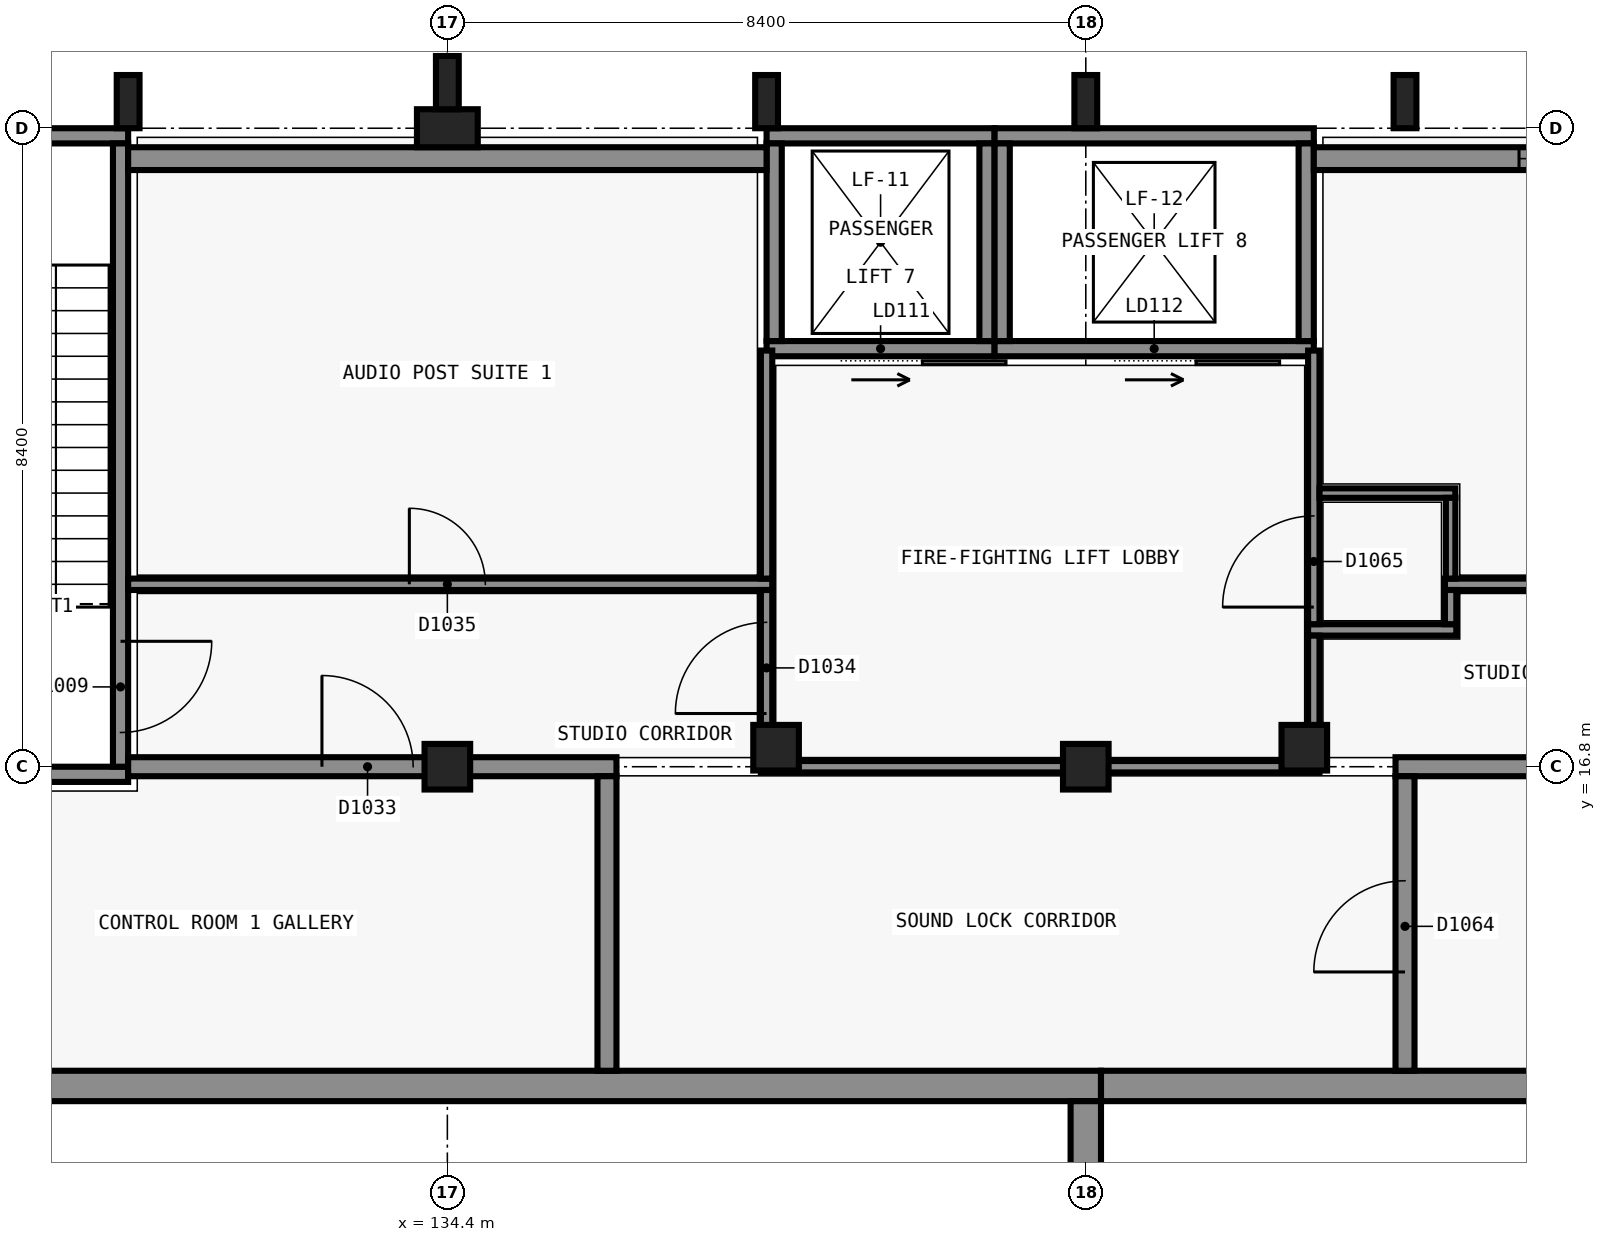
"""IFC4 building model, lengths in metres.
Left out: names, types, materials, properties, quantities, classifications, styles, units other than length and angle.
Written with IfcOpenShell. Run it as: python <this file> out.ifc"""

import sys

from ifc_helpers import new_model, si_unit, direction, frame, frame_2d, origin, origin_2d, place, context, subcontext, project, spatial, rectangle, extrude, element, fill, save


model = new_model("IFC4")
c1 = context("Model", 3, precision=1e-05, world=origin(), true_north=direction((0.0, 1.0)))
c2 = subcontext(c1, "Body", "Model", "MODEL_VIEW")
j1 = project(units=[si_unit("LENGTHUNIT", "METRE"), si_unit("PLANEANGLEUNIT", "RADIAN")], contexts=[c1])
p1 = place(None, origin())
s1 = spatial("IfcSite", under=j1, at=p1, CompositionType="ELEMENT")
p2 = place(p1, origin())
s2 = spatial("IfcBuilding", under=s1, at=p2, CompositionType="ELEMENT")
p3 = place(p2, frame((0.0, 0.0, 5.4)))
s3 = spatial("IfcBuildingStorey", under=s2, at=p3, CompositionType="ELEMENT", Elevation=5.4)
for number, where, z_axis, x_axis in (
    (1, (130.2, 16.7, 0.0), (0.0, 0.0, 1.0), (-1.0, 0.0, 0.0)),
    (2, (126.0, 25.1, 0.0), (0.0, 0.0, 1.0), (1.0, 0.0, 0.0)),
):
    element("IfcWall", number, at=place(p3, frame(where, z_axis=z_axis, x_axis=x_axis)), inside=s3, PredefinedType="SHEAR", context=c2, shape_type="SweptSolid", body=[
        extrude(rectangle(XDim=4.2, YDim=0.2, at=frame_2d((2.1, 0.0))), origin(), (0.0, 0.0, 1.0), 4.8),
    ])
p4 = place(p3, frame((130.1, 25.0, 0.0), z_axis=(0.0, 0.0, 1.0), x_axis=(0.0, -1.0, 0.0)))
e3 = element("IfcWall", 3, at=p4, inside=s3, PredefinedType="SHEAR", context=c2, shape_type="SweptSolid", body=[
    extrude(rectangle(XDim=8.2, YDim=0.2, at=frame_2d((4.1, 0.0))), origin(), (0.0, 0.0, 1.0), 4.8),
])
p5 = place(p4, frame((6.55, 0.0, 0.0)))
e4 = element("IfcOpeningElement", 4, at=p5, cuts=e3, PredefinedType="OPENING", context=c2, shape_type="SweptSolid", body=[
    extrude(rectangle(XDim=1.2, YDim=2.1, at=frame_2d((0.6, 1.05))), frame((0.0, 0.11, 0.0), z_axis=(0.0, -1.0, 0.0), x_axis=(1.0, 0.0, 0.0)), (0.0, 0.0, 1.0), 0.22),
])
p6 = place(p3, frame((141.6, 22.3, 0.0), z_axis=(0.0, 0.0, 1.0), x_axis=(-1.0, 0.0, 0.0)))
e5 = element("IfcWall", 5, at=p6, inside=s3, PredefinedType="SHEAR", context=c2, shape_type="SweptSolid", body=[
    extrude(rectangle(XDim=3.0, YDim=0.2, at=frame_2d((1.5, 0.0))), origin(), (0.0, 0.0, 1.0), 4.8),
])
p7 = place(p6, frame((0.95, 0.0, 0.0)))
e6 = element("IfcOpeningElement", 6, at=p7, cuts=e5, PredefinedType="OPENING", context=c2, shape_type="SweptSolid", body=[
    extrude(rectangle(XDim=1.1, YDim=2.1, at=frame_2d((0.55, 1.05))), frame((0.0, 0.11, 0.0), z_axis=(0.0, -1.0, 0.0), x_axis=(1.0, 0.0, 0.0)), (0.0, 0.0, 1.0), 0.22),
])
p8 = place(p3, frame((138.6, 25.1, 0.0), z_axis=(0.0, 0.0, 1.0), x_axis=(1.0, 0.0, 0.0)))
e7 = element("IfcWall", 7, at=p8, inside=s3, PredefinedType="SHEAR", context=c2, shape_type="SweptSolid", body=[
    extrude(rectangle(XDim=3.0, YDim=0.2, at=frame_2d((1.5, 0.0))), origin(), (0.0, 0.0, 1.0), 4.8),
])
for number, where, z_axis, x_axis in (
    (8, (138.7, 22.4, 0.0), (0.0, 0.0, 1.0), (0.0, 1.0, 0.0)),
    (9, (141.5, 25.0, 0.0), (0.0, 0.0, 1.0), (0.0, -1.0, 0.0)),
):
    element("IfcWall", number, at=place(p3, frame(where, z_axis=z_axis, x_axis=x_axis)), inside=s3, PredefinedType="SHEAR", context=c2, shape_type="SweptSolid", body=[
        extrude(rectangle(XDim=2.6, YDim=0.2, at=frame_2d((1.3, 0.0))), origin(), (0.0, 0.0, 1.0), 4.8),
    ])
p9 = place(p3, frame((145.8, 22.3, 0.0), z_axis=(0.0, 0.0, 1.0), x_axis=(-1.0, 0.0, 0.0)))
e10 = element("IfcWall", 10, at=p9, inside=s3, PredefinedType="SHEAR", context=c2, shape_type="SweptSolid", body=[
    extrude(rectangle(XDim=4.2, YDim=0.2, at=frame_2d((2.1, 0.0))), origin(), (0.0, 0.0, 1.0), 4.8),
])
p10 = place(p9, frame((1.55, 0.0, 0.0)))
e11 = element("IfcOpeningElement", 11, at=p10, cuts=e10, PredefinedType="OPENING", context=c2, shape_type="SweptSolid", body=[
    extrude(rectangle(XDim=1.1, YDim=2.1, at=frame_2d((0.55, 1.05))), frame((0.0, 0.11, 0.0), z_axis=(0.0, -1.0, 0.0), x_axis=(1.0, 0.0, 0.0)), (0.0, 0.0, 1.0), 0.22),
])
p11 = place(p3, frame((141.6, 25.1, 0.0), z_axis=(0.0, 0.0, 1.0), x_axis=(1.0, 0.0, 0.0)))
e12 = element("IfcWall", 12, at=p11, inside=s3, PredefinedType="SHEAR", context=c2, shape_type="SweptSolid", body=[
    extrude(rectangle(XDim=4.2, YDim=0.2, at=frame_2d((2.1, 0.0))), origin(), (0.0, 0.0, 1.0), 4.8),
])
for number, where, z_axis, x_axis in (
    (13, (141.7, 22.4, 0.0), (0.0, 0.0, 1.0), (0.0, 1.0, 0.0)),
    (14, (145.7, 25.0, 0.0), (0.0, 0.0, 1.0), (0.0, -1.0, 0.0)),
):
    element("IfcWall", number, at=place(p3, frame(where, z_axis=z_axis, x_axis=x_axis)), inside=s3, PredefinedType="SHEAR", context=c2, shape_type="SweptSolid", body=[
        extrude(rectangle(XDim=2.6, YDim=0.2, at=frame_2d((1.3, 0.0))), origin(), (0.0, 0.0, 1.0), 4.8),
    ])
p12 = place(p3, frame((126.0, 12.6, 0.0), z_axis=(0.0, 0.0, 1.0), x_axis=(1.0, 0.0, 0.0)))
e15 = element("IfcWall", 15, at=p12, inside=s3, PredefinedType="SHEAR", context=c2, shape_type="SweptSolid", body=[
    extrude(rectangle(XDim=17.0, YDim=0.4, at=frame_2d((8.5, 0.0))), origin(), (0.0, 0.0, 1.0), 4.8),
])
p13 = place(p3, frame((142.8, 12.4, 0.0), z_axis=(0.0, 0.0, 1.0), x_axis=(0.0, -1.0, 0.0)))
e16 = element("IfcWall", 16, at=p13, inside=s3, PredefinedType="SHEAR", context=c2, shape_type="SweptSolid", body=[
    extrude(rectangle(XDim=12.0, YDim=0.4, at=frame_2d((6.0, 0.0))), origin(), (0.0, 0.0, 1.0), 4.8),
])
p14 = place(p3, frame((143.0, 12.6, 0.0), z_axis=(0.0, 0.0, 1.0), x_axis=(1.0, 0.0, 0.0)))
e17 = element("IfcWall", 17, at=p14, inside=s3, PredefinedType="SHEAR", context=c2, shape_type="SweptSolid", body=[
    extrude(rectangle(XDim=25.0, YDim=0.4, at=frame_2d((12.5, 0.0))), origin(), (0.0, 0.0, 1.0), 4.8),
])
p15 = place(p3, frame((134.4, 16.8, 0.0), z_axis=(0.0, 0.0, 1.0), x_axis=(1.0, 0.0, 0.0)))
e18 = element("IfcColumn", 18, at=p15, inside=s3, PredefinedType="COLUMN", context=c2, shape_type="SweptSolid", body=[
    extrude(rectangle(XDim=0.6, YDim=0.6, at=origin_2d()), origin(), (0.0, 0.0, 1.0), 4.8),
])
p16 = place(p3, frame((134.4, 25.2, 0.0), z_axis=(0.0, 0.0, 1.0), x_axis=(1.0, 0.0, 0.0)))
e19 = element("IfcColumn", 19, at=p16, inside=s3, PredefinedType="COLUMN", context=c2, shape_type="SweptSolid", body=[
    extrude(rectangle(XDim=0.8, YDim=0.5, at=origin_2d()), origin(), (0.0, 0.0, 1.0), 4.8),
])
for number, where, z_axis, x_axis in (
    (20, (142.8, 16.8, 0.0), (0.0, 0.0, 1.0), (1.0, 0.0, 0.0)),
    (21, (138.725, 17.05, 0.0), (0.0, 0.0, 1.0), (1.0, 0.0, 0.0)),
    (22, (145.675, 17.05, 0.0), (0.0, 0.0, 1.0), (1.0, 0.0, 0.0)),
):
    element("IfcColumn", number, at=place(p3, frame(where, z_axis=z_axis, x_axis=x_axis)), inside=s3, PredefinedType="COLUMN", context=c2, shape_type="SweptSolid", body=[
        extrude(rectangle(XDim=0.6, YDim=0.6, at=origin_2d()), origin(), (0.0, 0.0, 1.0), 4.8),
    ])
p17 = place(p3, frame((130.2, 24.8, 0.0), z_axis=(0.0, 0.0, 1.0), x_axis=(1.0, 0.0, 0.0)))
e23 = element("IfcWall", 23, at=p17, inside=s3, PredefinedType="SOLIDWALL", context=c2, shape_type="SweptSolid", body=[
    extrude(rectangle(XDim=8.4, YDim=0.3, at=frame_2d((4.2, 0.0))), origin(), (0.0, 0.0, 1.0), 4.5),
])
p18 = place(p3, frame((145.8, 24.8, 0.0), z_axis=(0.0, 0.0, 1.0), x_axis=(1.0, 0.0, 0.0)))
e24 = element("IfcWall", 24, at=p18, inside=s3, PredefinedType="SOLIDWALL", context=c2, shape_type="SweptSolid", body=[
    extrude(rectangle(XDim=18.0, YDim=0.3, at=frame_2d((9.0, 0.0))), origin(), (0.0, 0.0, 1.0), 4.5),
])
p19 = place(p18, frame((2.7, 0.0, 1.5)))
e25 = element("IfcOpeningElement", 25, at=p19, cuts=e24, PredefinedType="OPENING", context=c2, shape_type="SweptSolid", body=[
    extrude(rectangle(XDim=1.2, YDim=0.9, at=frame_2d((0.6, 0.45))), frame((0.0, 0.16, 0.0), z_axis=(0.0, -1.0, 0.0), x_axis=(1.0, 0.0, 0.0)), (0.0, 0.0, 1.0), 0.32),
])
p20 = place(p18, frame((6.9, 0.0, 1.5)))
e26 = element("IfcOpeningElement", 26, at=p20, cuts=e24, PredefinedType="OPENING", context=c2, shape_type="SweptSolid", body=[
    extrude(rectangle(XDim=1.2, YDim=0.9, at=frame_2d((0.6, 0.45))), frame((0.0, 0.16, 0.0), z_axis=(0.0, -1.0, 0.0), x_axis=(1.0, 0.0, 0.0)), (0.0, 0.0, 1.0), 0.32),
])
for number, where, z_axis, x_axis in (
    (27, (130.2, 25.55, 0.0), (0.0, 0.0, 1.0), (1.0, 0.0, 0.0)),
    (28, (134.4, 25.8, 0.0), (0.0, 0.0, 1.0), (1.0, 0.0, 0.0)),
    (29, (138.6, 25.55, 0.0), (0.0, 0.0, 1.0), (1.0, 0.0, 0.0)),
    (30, (142.8, 25.55, 0.0), (0.0, 0.0, 1.0), (1.0, 0.0, 0.0)),
    (31, (147.0, 25.55, 0.0), (0.0, 0.0, 1.0), (1.0, 0.0, 0.0)),
):
    element("IfcColumn", number, at=place(p3, frame(where, z_axis=z_axis, x_axis=x_axis)), inside=s3, PredefinedType="PILASTER", context=c2, shape_type="SweptSolid", body=[
        extrude(rectangle(XDim=0.3, YDim=0.7, at=origin_2d()), origin(), (0.0, 0.0, 1.0), 4.8),
    ])
p21 = place(p3, frame((130.2, 16.8, 0.0), z_axis=(0.0, 0.0, 1.0), x_axis=(1.0, 0.0, 0.0)))
e32 = element("IfcWall", 32, at=p21, inside=s3, PredefinedType="PARTITIONING", context=c2, shape_type="SweptSolid", body=[
    extrude(rectangle(XDim=6.425, YDim=0.25, at=frame_2d((3.212, 0.0))), origin(), (0.0, 0.0, 1.0), 3.8),
])
p22 = place(p21, frame((2.55, 0.0, 0.0)))
e33 = element("IfcOpeningElement", 33, at=p22, cuts=e32, PredefinedType="OPENING", context=c2, shape_type="SweptSolid", body=[
    extrude(rectangle(XDim=1.2, YDim=2.1, at=frame_2d((0.6, 1.05))), frame((0.0, 0.135, 0.0), z_axis=(0.0, -1.0, 0.0), x_axis=(1.0, 0.0, 0.0)), (0.0, 0.0, 1.0), 0.27),
])
p23 = place(p3, frame((146.875, 16.8, 0.0), z_axis=(0.0, 0.0, 1.0), x_axis=(1.0, 0.0, 0.0)))
e34 = element("IfcWall", 34, at=p23, inside=s3, PredefinedType="PARTITIONING", context=c2, shape_type="SweptSolid", body=[
    extrude(rectangle(XDim=16.925, YDim=0.25, at=frame_2d((8.462, 0.0))), origin(), (0.0, 0.0, 1.0), 3.8),
])
p24 = place(p3, frame((136.5, 12.8, 0.0), z_axis=(0.0, 0.0, 1.0), x_axis=(0.0, 1.0, 0.0)))
e35 = element("IfcWall", 35, at=p24, inside=s3, PredefinedType="PARTITIONING", context=c2, shape_type="SweptSolid", body=[
    extrude(rectangle(XDim=3.875, YDim=0.25, at=frame_2d((1.938, 0.0))), origin(), (0.0, 0.0, 1.0), 3.8),
])
p25 = place(p3, frame((147.0, 12.8, 0.0), z_axis=(0.0, 0.0, 1.0), x_axis=(0.0, 1.0, 0.0)))
e36 = element("IfcWall", 36, at=p25, inside=s3, PredefinedType="PARTITIONING", context=c2, shape_type="SweptSolid", body=[
    extrude(rectangle(XDim=3.875, YDim=0.25, at=frame_2d((1.938, 0.0))), origin(), (0.0, 0.0, 1.0), 3.8),
])
p26 = place(p25, frame((1.3, 0.0, 0.0)))
e37 = element("IfcOpeningElement", 37, at=p26, cuts=e36, PredefinedType="OPENING", context=c2, shape_type="SweptSolid", body=[
    extrude(rectangle(XDim=1.2, YDim=2.1, at=frame_2d((0.6, 1.05))), frame((0.0, 0.135, 0.0), z_axis=(0.0, -1.0, 0.0), x_axis=(1.0, 0.0, 0.0)), (0.0, 0.0, 1.0), 0.27),
])
p27 = place(p3, frame((145.725, 18.6, 0.0), z_axis=(0.0, 0.0, 1.0), x_axis=(1.0, 0.0, 0.0)))
e38 = element("IfcWall", 38, at=p27, inside=s3, PredefinedType="PARTITIONING", context=c2, shape_type="SweptSolid", body=[
    extrude(rectangle(XDim=1.95, YDim=0.15, at=frame_2d((0.975, 0.0))), origin(), (0.0, 0.0, 1.0), 4.5),
])
p28 = place(p3, frame((130.2, 19.2, 0.0), z_axis=(0.0, 0.0, 1.0), x_axis=(1.0, 0.0, 0.0)))
e39 = element("IfcWall", 39, at=p28, inside=s3, PredefinedType="PARTITIONING", context=c2, shape_type="SweptSolid", body=[
    extrude(rectangle(XDim=8.475, YDim=0.15, at=frame_2d((4.237, 0.0))), origin(), (0.0, 0.0, 1.0), 3.8),
])
p29 = place(p28, frame((3.7, 0.0, 0.0)))
e40 = element("IfcOpeningElement", 40, at=p29, cuts=e39, PredefinedType="OPENING", context=c2, shape_type="SweptSolid", body=[
    extrude(rectangle(XDim=1.0, YDim=2.1, at=frame_2d((0.5, 1.05))), frame((0.0, 0.085, 0.0), z_axis=(0.0, -1.0, 0.0), x_axis=(1.0, 0.0, 0.0)), (0.0, 0.0, 1.0), 0.17),
])
p30 = place(p3, frame((147.525, 19.2, 0.0), z_axis=(0.0, 0.0, 1.0), x_axis=(1.0, 0.0, 0.0)))
e41 = element("IfcWall", 41, at=p30, inside=s3, PredefinedType="PARTITIONING", context=c2, shape_type="SweptSolid", body=[
    extrude(rectangle(XDim=16.275, YDim=0.15, at=frame_2d((8.137, 0.0))), origin(), (0.0, 0.0, 1.0), 3.8),
])
p31 = place(p30, frame((11.575, 0.0, 0.0)))
e42 = element("IfcOpeningElement", 42, at=p31, cuts=e41, PredefinedType="OPENING", context=c2, shape_type="SweptSolid", body=[
    extrude(rectangle(XDim=1.0, YDim=2.1, at=frame_2d((0.5, 1.05))), frame((0.0, 0.085, 0.0), z_axis=(0.0, -1.0, 0.0), x_axis=(1.0, 0.0, 0.0)), (0.0, 0.0, 1.0), 0.17),
])
p32 = place(p3, frame((138.525, 16.8, 0.0), z_axis=(0.0, 0.0, 1.0), x_axis=(1.0, 0.0, 0.0)))
e43 = element("IfcWall", 43, at=p32, inside=s3, PredefinedType="SOLIDWALL", context=c2, shape_type="SweptSolid", body=[
    extrude(rectangle(XDim=7.35, YDim=0.15, at=frame_2d((3.675, 0.0))), origin(), (0.0, 0.0, 1.0), 3.8),
])
p33 = place(p3, frame((147.6, 18.675, 0.0), z_axis=(0.0, 0.0, 1.0), x_axis=(0.0, 1.0, 0.0)))
e44 = element("IfcWall", 44, at=p33, inside=s3, PredefinedType="PARTITIONING", context=c2, shape_type="SweptSolid", body=[
    extrude(rectangle(XDim=0.45, YDim=0.15, at=frame_2d((0.225, 0.0))), origin(), (0.0, 0.0, 1.0), 4.5),
])
p34 = place(p3, frame((138.6, 16.875, 0.0), z_axis=(0.0, 0.0, 1.0), x_axis=(0.0, 1.0, 0.0)))
e45 = element("IfcWall", 45, at=p34, inside=s3, PredefinedType="SOLIDWALL", context=c2, shape_type="SweptSolid", body=[
    extrude(rectangle(XDim=2.25, YDim=0.15, at=frame_2d((1.125, 0.0))), origin(), (0.0, 0.0, 1.0), 3.8),
])
p35 = place(p34, frame((0.625, 0.0, 0.0)))
e46 = element("IfcOpeningElement", 46, at=p35, cuts=e45, PredefinedType="OPENING", context=c2, shape_type="SweptSolid", body=[
    extrude(rectangle(XDim=1.2, YDim=2.1, at=frame_2d((0.6, 1.05))), frame((0.0, 0.085, 0.0), z_axis=(0.0, -1.0, 0.0), x_axis=(1.0, 0.0, 0.0)), (0.0, 0.0, 1.0), 0.17),
])
p36 = place(p3, frame((138.6, 19.275, 0.0), z_axis=(0.0, 0.0, 1.0), x_axis=(0.0, 1.0, 0.0)))
e47 = element("IfcWall", 47, at=p36, inside=s3, PredefinedType="SOLIDWALL", context=c2, shape_type="SweptSolid", body=[
    extrude(rectangle(XDim=3.0, YDim=0.15, at=frame_2d((1.5, 0.0))), origin(), (0.0, 0.0, 1.0), 4.5),
])
p37 = place(p3, frame((145.8, 16.875, 0.0), z_axis=(0.0, 0.0, 1.0), x_axis=(0.0, 1.0, 0.0)))
e48 = element("IfcWall", 48, at=p37, inside=s3, PredefinedType="SOLIDWALL", context=c2, shape_type="SweptSolid", body=[
    extrude(rectangle(XDim=1.65, YDim=0.15, at=frame_2d((0.825, 0.0))), origin(), (0.0, 0.0, 1.0), 3.8),
])
p38 = place(p3, frame((145.8, 18.675, 0.0), z_axis=(0.0, 0.0, 1.0), x_axis=(0.0, 1.0, 0.0)))
e49 = element("IfcWall", 49, at=p38, inside=s3, PredefinedType="SOLIDWALL", context=c2, shape_type="SweptSolid", body=[
    extrude(rectangle(XDim=3.6, YDim=0.15, at=frame_2d((1.8, 0.0))), origin(), (0.0, 0.0, 1.0), 4.5),
])
p39 = place(p38, frame((0.225, 0.0, 0.0)))
e50 = element("IfcOpeningElement", 50, at=p39, cuts=e49, PredefinedType="OPENING", context=c2, shape_type="SweptSolid", body=[
    extrude(rectangle(XDim=1.2, YDim=2.1, at=frame_2d((0.6, 1.05))), frame((0.0, 0.085, 0.0), z_axis=(0.0, -1.0, 0.0), x_axis=(1.0, 0.0, 0.0)), (0.0, 0.0, 1.0), 0.17),
])
p40 = place(p3, frame((145.875, 20.4, 0.0), z_axis=(0.0, 0.0, 1.0), x_axis=(1.0, 0.0, 0.0)))
e51 = element("IfcWall", 51, at=p40, inside=s3, PredefinedType="PARTITIONING", context=c2, shape_type="SweptSolid", body=[
    extrude(rectangle(XDim=1.788, YDim=0.125, at=frame_2d((0.894, 0.0))), origin(), (0.0, 0.0, 1.0), 4.5),
])
p41 = place(p3, frame((147.6, 19.275, 0.0), z_axis=(0.0, 0.0, 1.0), x_axis=(0.0, 1.0, 0.0)))
e52 = element("IfcWall", 52, at=p41, inside=s3, PredefinedType="PARTITIONING", context=c2, shape_type="SweptSolid", body=[
    extrude(rectangle(XDim=1.062, YDim=0.125, at=frame_2d((0.531, 0.0))), origin(), (0.0, 0.0, 1.0), 4.5),
])
p42 = place(p19, origin())
e53 = element("IfcWindow", 53, at=p42, inside=s3, PartitioningType="SINGLE_PANEL", PredefinedType="WINDOW", context=c2, shape_type="SweptSolid", body=[
    extrude(rectangle(XDim=1.2, YDim=0.9, at=frame_2d((0.6, 0.45))), frame((0.0, 0.03, 0.0), z_axis=(0.0, -1.0, 0.0), x_axis=(1.0, 0.0, 0.0)), (0.0, 0.0, 1.0), 0.06),
])
fill(e25, e53)
p43 = place(p7, origin())
e54 = element("IfcDoor", 54, at=p43, inside=s3, OperationType="SLIDING_TO_LEFT", PredefinedType="DOOR", context=c2, shape_type="SweptSolid", body=[
    extrude(rectangle(XDim=1.1, YDim=2.1, at=frame_2d((0.55, 1.05))), frame((0.0, 0.025, 0.0), z_axis=(0.0, -1.0, 0.0), x_axis=(1.0, 0.0, 0.0)), (0.0, 0.0, 1.0), 0.05),
])
fill(e6, e54)
p44 = place(p10, origin())
e55 = element("IfcDoor", 55, at=p44, inside=s3, OperationType="SLIDING_TO_LEFT", PredefinedType="DOOR", context=c2, shape_type="SweptSolid", body=[
    extrude(rectangle(XDim=1.1, YDim=2.1, at=frame_2d((0.55, 1.05))), frame((0.0, 0.025, 0.0), z_axis=(0.0, -1.0, 0.0), x_axis=(1.0, 0.0, 0.0)), (0.0, 0.0, 1.0), 0.05),
])
fill(e11, e55)
p45 = place(p5, origin())
e56 = element("IfcDoor", 56, at=p45, inside=s3, OperationType="SINGLE_SWING_LEFT", PredefinedType="DOOR", context=c2, shape_type="SweptSolid", body=[
    extrude(rectangle(XDim=1.2, YDim=2.1, at=frame_2d((0.6, 1.05))), frame((0.0, 0.025, 0.0), z_axis=(0.0, -1.0, 0.0), x_axis=(1.0, 0.0, 0.0)), (0.0, 0.0, 1.0), 0.05),
])
fill(e4, e56)
p46 = place(p22, origin())
e57 = element("IfcDoor", 57, at=p46, inside=s3, OperationType="SINGLE_SWING_RIGHT", PredefinedType="DOOR", context=c2, shape_type="SweptSolid", body=[
    extrude(rectangle(XDim=1.2, YDim=2.1, at=frame_2d((0.6, 1.05))), frame((0.0, 0.025, 0.0), z_axis=(0.0, -1.0, 0.0), x_axis=(1.0, 0.0, 0.0)), (0.0, 0.0, 1.0), 0.05),
])
fill(e33, e57)
p47 = place(p35, origin())
e58 = element("IfcDoor", 58, at=p47, inside=s3, OperationType="SINGLE_SWING_RIGHT", PredefinedType="DOOR", context=c2, shape_type="SweptSolid", body=[
    extrude(rectangle(XDim=1.2, YDim=2.1, at=frame_2d((0.6, 1.05))), frame((0.0, 0.025, 0.0), z_axis=(0.0, -1.0, 0.0), x_axis=(1.0, 0.0, 0.0)), (0.0, 0.0, 1.0), 0.05),
])
fill(e46, e58)
p48 = place(p29, origin())
e59 = element("IfcDoor", 59, at=p48, inside=s3, OperationType="SINGLE_SWING_LEFT", PredefinedType="DOOR", context=c2, shape_type="SweptSolid", body=[
    extrude(rectangle(XDim=1.0, YDim=2.1, at=frame_2d((0.5, 1.05))), frame((0.0, 0.025, 0.0), z_axis=(0.0, -1.0, 0.0), x_axis=(1.0, 0.0, 0.0)), (0.0, 0.0, 1.0), 0.05),
])
fill(e40, e59)
p49 = place(p26, origin())
e60 = element("IfcDoor", 60, at=p49, inside=s3, OperationType="SINGLE_SWING_LEFT", PredefinedType="DOOR", context=c2, shape_type="SweptSolid", body=[
    extrude(rectangle(XDim=1.2, YDim=2.1, at=frame_2d((0.6, 1.05))), frame((0.0, 0.025, 0.0), z_axis=(0.0, -1.0, 0.0), x_axis=(1.0, 0.0, 0.0)), (0.0, 0.0, 1.0), 0.05),
])
fill(e37, e60)
p50 = place(p39, origin())
e61 = element("IfcDoor", 61, at=p50, inside=s3, OperationType="SINGLE_SWING_RIGHT", PredefinedType="DOOR", context=c2, shape_type="SweptSolid", body=[
    extrude(rectangle(XDim=1.2, YDim=2.1, at=frame_2d((0.6, 1.05))), frame((0.0, 0.025, 0.0), z_axis=(0.0, -1.0, 0.0), x_axis=(1.0, 0.0, 0.0)), (0.0, 0.0, 1.0), 0.05),
])
fill(e50, e61)
save(model, sys.argv[1])
